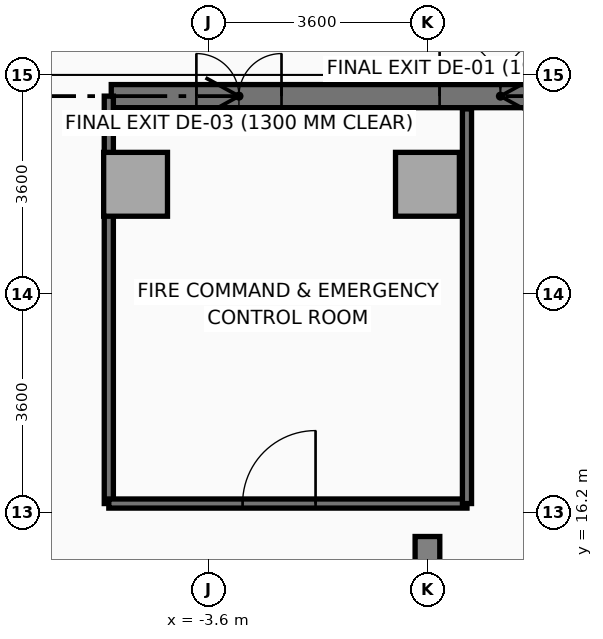
"""IFC4 building model, lengths in metres.
Left out: names, types, materials, properties, quantities, classifications, styles, units other than length and angle.
Written with IfcOpenShell. Run it as: python <this file> out.ifc"""

import sys

from ifc_helpers import new_model, si_unit, direction, frame, frame_2d, origin, origin_2d, place, context, subcontext, project, spatial, rectangle, i_section, extrude, source, transform, mapped, element, fill, save


model = new_model("IFC4")
c1 = context("Model", 3, precision=1e-05, world=origin(), true_north=direction((0.0, 1.0)))
c2 = subcontext(c1, "Body", "Model", "MODEL_VIEW")
j1 = project(units=[si_unit("LENGTHUNIT", "METRE"), si_unit("PLANEANGLEUNIT", "RADIAN")], contexts=[c1])
p1 = place(None, origin())
s1 = spatial("IfcSite", under=j1, at=p1, CompositionType="ELEMENT")
p2 = place(p1, origin())
s2 = spatial("IfcBuilding", under=s1, at=p2, CompositionType="ELEMENT")
p3 = place(p2, origin())
s3 = spatial("IfcBuildingStorey", under=s2, at=p3, CompositionType="ELEMENT", Elevation=0.0)
m1 = source(origin(), c2, "Body", "SweptSolid", [
    extrude(rectangle(XDim=1.05, YDim=1.05, at=origin_2d()), origin(), (0.0, 0.0, 1.0), 5.15),
])
p4 = place(p3, frame((-4.8, 21.6, 0.0), z_axis=(0.0, 0.0, 1.0), x_axis=(1.0, 0.0, 0.0)))
e1 = element("IfcColumn", 1, at=p4, inside=s3, PredefinedType="COLUMN", context=c2, shape_type="MappedRepresentation", body=[
    mapped(m1, transform((0.0, 0.0, 0.0), x_axis=(1.0, 0.0, 0.0), y_axis=(0.0, 1.0, 0.0), z_axis=(0.0, 0.0, 1.0), scale=1.0)),
])
m2 = source(origin(), c2, "Body", "SweptSolid", [
    extrude(i_section(OverallWidth=0.406, OverallDepth=0.416, WebThickness=0.024, FlangeThickness=0.039, at=origin_2d()), origin(), (0.0, 0.0, 1.0), 5.15),
])
p5 = place(p3, frame((0.0, 15.6, 0.0), z_axis=(0.0, 0.0, 1.0), x_axis=(1.0, 0.0, 0.0)))
e2 = element("IfcColumn", 2, at=p5, inside=s3, PredefinedType="COLUMN", context=c2, shape_type="MappedRepresentation", body=[
    mapped(m2, transform((0.0, 0.0, 0.0), x_axis=(1.0, 0.0, 0.0), y_axis=(0.0, 1.0, 0.0), z_axis=(0.0, 0.0, 1.0), scale=1.0)),
])
p6 = place(p3, frame((0.0, 21.6, 0.0), z_axis=(0.0, 0.0, 1.0), x_axis=(1.0, 0.0, 0.0)))
e3 = element("IfcColumn", 3, at=p6, inside=s3, PredefinedType="COLUMN", context=c2, shape_type="MappedRepresentation", body=[
    mapped(m1, transform((0.0, 0.0, 0.0), x_axis=(1.0, 0.0, 0.0), y_axis=(0.0, 1.0, 0.0), z_axis=(0.0, 0.0, 1.0), scale=1.0)),
])
p7 = place(p3, frame((-5.2, 23.05, 0.0), z_axis=(0.0, 0.0, 1.0), x_axis=(1.0, 0.0, 0.0)))
e4 = element("IfcWall", 4, at=p7, inside=s3, PredefinedType="SOLIDWALL", context=c2, shape_type="SweptSolid", body=[
    extrude(rectangle(XDim=10.4, YDim=0.38, at=frame_2d((5.2, 0.0))), origin(), (0.0, 0.0, 1.0), 5.15),
])
p8 = place(p7, frame((5.4, 0.0, 0.0)))
e5 = element("IfcOpeningElement", 5, at=p8, cuts=e4, PredefinedType="OPENING", context=c2, shape_type="SweptSolid", body=[
    extrude(rectangle(XDim=2.0, YDim=2.6, at=frame_2d((1.0, 1.3))), frame((0.0, 0.2, 0.0), z_axis=(0.0, -1.0, 0.0), x_axis=(1.0, 0.0, 0.0)), (0.0, 0.0, 1.0), 0.4),
])
p9 = place(p7, frame((1.4, 0.0, 0.0)))
e6 = element("IfcOpeningElement", 6, at=p9, cuts=e4, PredefinedType="OPENING", context=c2, shape_type="SweptSolid", body=[
    extrude(rectangle(XDim=1.4, YDim=2.4, at=frame_2d((0.7, 1.2))), frame((0.0, 0.2, 0.0), z_axis=(0.0, -1.0, 0.0), x_axis=(1.0, 0.0, 0.0)), (0.0, 0.0, 1.0), 0.4),
])
p10 = place(p3, frame((-5.24, 16.35, 0.0), z_axis=(0.0, 0.0, 1.0), x_axis=(0.0, 1.0, 0.0)))
e7 = element("IfcWall", 7, at=p10, inside=s3, PredefinedType="PARTITIONING", context=c2, shape_type="SweptSolid", body=[
    extrude(rectangle(XDim=6.7, YDim=0.15, at=frame_2d((3.35, 0.0))), origin(), (0.0, 0.0, 1.0), 5.15),
])
p11 = place(p3, frame((-5.24, 16.35, 0.0), z_axis=(0.0, 0.0, 1.0), x_axis=(1.0, 0.0, 0.0)))
e8 = element("IfcWall", 8, at=p11, inside=s3, PredefinedType="PARTITIONING", context=c2, shape_type="SweptSolid", body=[
    extrude(rectangle(XDim=5.89, YDim=0.15, at=frame_2d((2.945, 0.0))), origin(), (0.0, 0.0, 1.0), 4.55),
])
p12 = place(p11, frame((2.2, 0.0, 0.0)))
e9 = element("IfcOpeningElement", 9, at=p12, cuts=e8, PredefinedType="OPENING", context=c2, shape_type="SweptSolid", body=[
    extrude(rectangle(XDim=1.2, YDim=2.2, at=frame_2d((0.6, 1.1))), frame((0.0, 0.085, 0.0), z_axis=(0.0, -1.0, 0.0), x_axis=(1.0, 0.0, 0.0)), (0.0, 0.0, 1.0), 0.17),
])
p13 = place(p3, frame((0.65, 16.35, 0.0), z_axis=(0.0, 0.0, 1.0), x_axis=(0.0, 1.0, 0.0)))
e10 = element("IfcWall", 10, at=p13, inside=s3, PredefinedType="PARTITIONING", context=c2, shape_type="SweptSolid", body=[
    extrude(rectangle(XDim=6.49, YDim=0.15, at=frame_2d((3.245, 0.0))), origin(), (0.0, 0.0, 1.0), 3.8),
])
m3 = source(origin(), c2, "Body", "SweptSolid", [
    extrude(rectangle(XDim=2.0, YDim=2.6, at=frame_2d((1.0, 1.3))), frame((0.0, 0.025, 0.0), z_axis=(0.0, -1.0, 0.0), x_axis=(1.0, 0.0, 0.0)), (0.0, 0.0, 1.0), 0.05),
])
p14 = place(p8, origin())
e11 = element("IfcDoor", 11, at=p14, inside=s3, OperationType="DOUBLE_DOOR_SINGLE_SWING", PredefinedType="DOOR", context=c2, shape_type="MappedRepresentation", body=[
    mapped(m3, transform((0.0, 0.0, 0.0), x_axis=(1.0, 0.0, 0.0), y_axis=(0.0, 1.0, 0.0), z_axis=(0.0, 0.0, 1.0), scale=1.0)),
])
fill(e5, e11)
m4 = source(origin(), c2, "Body", "SweptSolid", [
    extrude(rectangle(XDim=1.4, YDim=2.4, at=frame_2d((0.7, 1.2))), frame((0.0, 0.025, 0.0), z_axis=(0.0, -1.0, 0.0), x_axis=(1.0, 0.0, 0.0)), (0.0, 0.0, 1.0), 0.05),
])
p15 = place(p9, origin())
e12 = element("IfcDoor", 12, at=p15, inside=s3, OperationType="DOUBLE_DOOR_SINGLE_SWING", PredefinedType="DOOR", context=c2, shape_type="MappedRepresentation", body=[
    mapped(m4, transform((0.0, 0.0, 0.0), x_axis=(1.0, 0.0, 0.0), y_axis=(0.0, 1.0, 0.0), z_axis=(0.0, 0.0, 1.0), scale=1.0)),
])
fill(e6, e12)
m5 = source(origin(), c2, "Body", "SweptSolid", [
    extrude(rectangle(XDim=1.2, YDim=2.2, at=frame_2d((0.6, 1.1))), frame((0.0, 0.025, 0.0), z_axis=(0.0, -1.0, 0.0), x_axis=(1.0, 0.0, 0.0)), (0.0, 0.0, 1.0), 0.05),
])
p16 = place(p12, origin())
e13 = element("IfcDoor", 13, at=p16, inside=s3, OperationType="SINGLE_SWING_RIGHT", PredefinedType="DOOR", context=c2, shape_type="MappedRepresentation", body=[
    mapped(m5, transform((0.0, 0.0, 0.0), x_axis=(1.0, 0.0, 0.0), y_axis=(0.0, 1.0, 0.0), z_axis=(0.0, 0.0, 1.0), scale=1.0)),
])
fill(e9, e13)
save(model, sys.argv[1])
